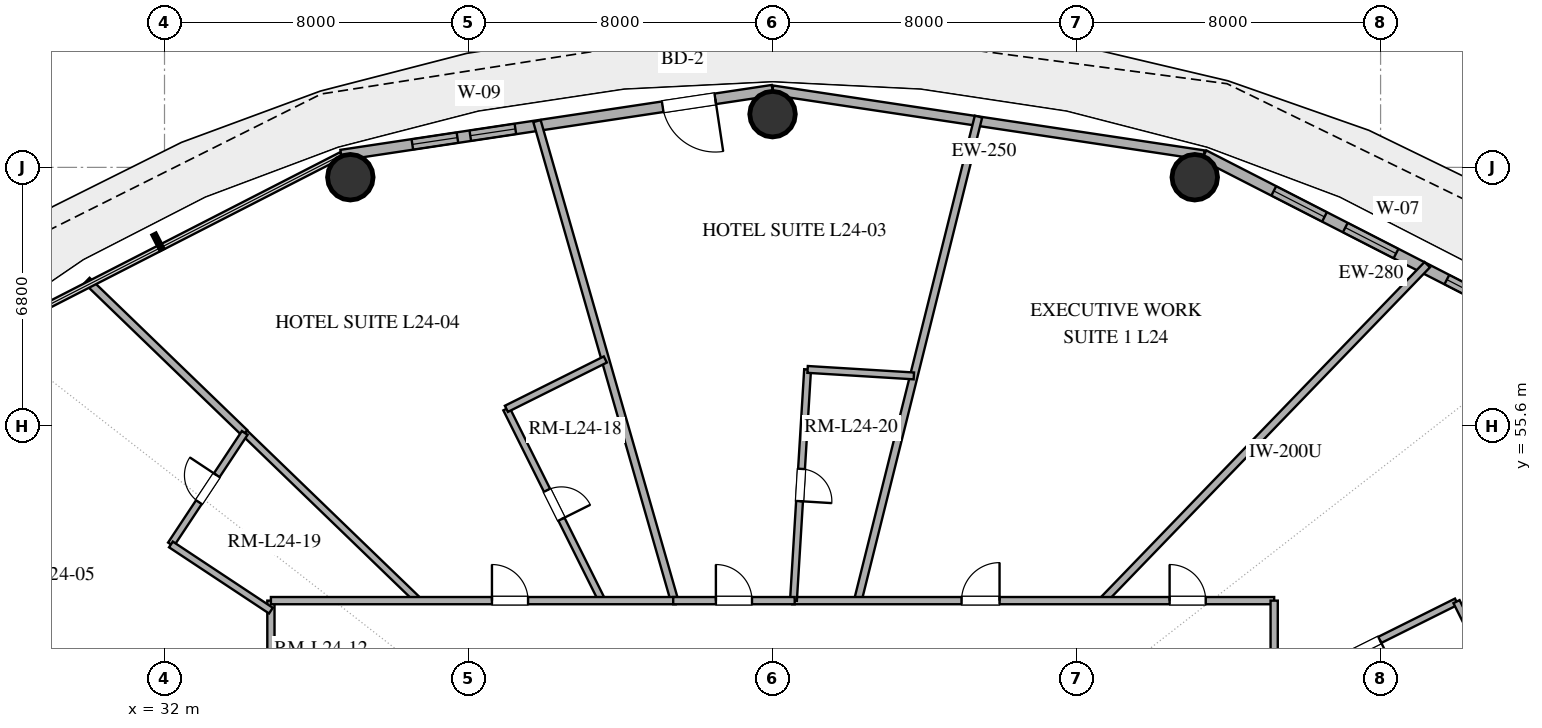
"""IFC4 building model, lengths in metres.
Left out: names, types, materials, properties, quantities, classifications, styles, units other than length and angle.
Written with IfcOpenShell. Run it as: python <this file> out.ifc"""

import sys

from ifc_helpers import new_model, si_unit, direction, frame, frame_2d, origin, origin_2d, place, context, subcontext, project, spatial, rectangle, hollow_circle, extrude, element, fill, save


model = new_model("IFC4")
c1 = context("Model", 3, precision=1e-05, world=origin(), true_north=direction((0.0, 1.0)))
c2 = subcontext(c1, "Body", "Model", "MODEL_VIEW")
j1 = project(units=[si_unit("LENGTHUNIT", "METRE"), si_unit("PLANEANGLEUNIT", "RADIAN")], contexts=[c1])
p1 = place(None, origin())
s1 = spatial("IfcSite", under=j1, at=p1, CompositionType="ELEMENT")
p2 = place(p1, origin())
s2 = spatial("IfcBuilding", under=s1, at=p2, CompositionType="ELEMENT")
p3 = place(p2, frame((0.0, 0.0, 98.4)))
s3 = spatial("IfcBuildingStorey", under=s2, at=p3, CompositionType="ELEMENT", Elevation=98.4)
for number, where, z_axis, x_axis in (
    (1, (59.11, 62.141, 0.0), (0.0, 0.0, 1.0), (1.0, 0.0, 0.0)),
    (2, (48.0, 63.8, 0.0), (0.0, 0.0, 1.0), (1.0, 0.0, 0.0)),
    (3, (36.89, 62.141, 0.0), (0.0, 0.0, 1.0), (1.0, 0.0, 0.0)),
):
    element("IfcColumn", number, at=place(p3, frame(where, z_axis=z_axis, x_axis=x_axis)), inside=s3, PredefinedType="COLUMN", context=c2, shape_type="SweptSolid", body=[
        extrude(hollow_circle(Radius=0.6, WallThickness=0.032, at=origin_2d()), origin(), (0.0, 0.0, 1.0), 3.38),
    ])
p4 = place(p3, frame((68.84, 57.86, 0.0), z_axis=(0.0, 0.0, 1.0), x_axis=(-0.889959505023, 0.45603955905, 0.0)))
e4 = element("IfcWall", 4, at=p4, inside=s3, PredefinedType="SOLIDWALL", context=c2, shape_type="SweptSolid", body=[
    extrude(rectangle(XDim=10.662, YDim=0.28, at=frame_2d((5.331, 0.0))), origin(), (0.0, 0.0, 1.0), 3.38),
])
p5 = place(p4, frame((1.979, 0.0, 0.85)))
e5 = element("IfcOpeningElement", 5, at=p5, cuts=e4, PredefinedType="OPENING", context=c2, shape_type="SweptSolid", body=[
    extrude(rectangle(XDim=1.5, YDim=2.0, at=frame_2d((0.75, 1.0))), frame((0.0, 0.15, 0.0), z_axis=(0.0, -1.0, 0.0), x_axis=(1.0, 0.0, 0.0)), (0.0, 0.0, 1.0), 0.3),
])
p6 = place(p4, frame((4.982, 0.0, 0.85)))
e6 = element("IfcOpeningElement", 6, at=p6, cuts=e4, PredefinedType="OPENING", context=c2, shape_type="SweptSolid", body=[
    extrude(rectangle(XDim=1.5, YDim=1.8, at=frame_2d((0.75, 0.9))), frame((0.0, 0.15, 0.0), z_axis=(0.0, -1.0, 0.0), x_axis=(1.0, 0.0, 0.0)), (0.0, 0.0, 1.0), 0.3),
])
p7 = place(p4, frame((7.096, 0.0, 0.85)))
e7 = element("IfcOpeningElement", 7, at=p7, cuts=e4, PredefinedType="OPENING", context=c2, shape_type="SweptSolid", body=[
    extrude(rectangle(XDim=1.5, YDim=1.8, at=frame_2d((0.75, 0.9))), frame((0.0, 0.15, 0.0), z_axis=(0.0, -1.0, 0.0), x_axis=(1.0, 0.0, 0.0)), (0.0, 0.0, 1.0), 0.3),
])
p8 = place(p3, frame((59.351, 62.723, 0.0), z_axis=(0.0, 0.0, 1.0), x_axis=(-0.988877774656, 0.148730450117, 0.0)))
e8 = element("IfcWall", 8, at=p8, inside=s3, PredefinedType="SOLIDWALL", context=c2, shape_type="SweptSolid", body=[
    extrude(rectangle(XDim=11.479, YDim=0.25, at=frame_2d((5.74, 0.0))), origin(), (0.0, 0.0, 1.0), 3.38),
])
p9 = place(p3, frame((48.0, 64.43, 0.0), z_axis=(0.0, 0.0, 1.0), x_axis=(-0.988877774656, -0.148730450117, 0.0)))
e9 = element("IfcWall", 9, at=p9, inside=s3, PredefinedType="SOLIDWALL", context=c2, shape_type="SweptSolid", body=[
    extrude(rectangle(XDim=11.479, YDim=0.28, at=frame_2d((5.74, 0.0))), origin(), (0.0, 0.0, 1.0), 3.38),
])
p10 = place(p9, frame((1.524, 0.0, 0.0)))
e10 = element("IfcOpeningElement", 10, at=p10, cuts=e9, PredefinedType="OPENING", context=c2, shape_type="SweptSolid", body=[
    extrude(rectangle(XDim=1.4, YDim=2.2, at=frame_2d((0.7, 1.1))), frame((0.0, 0.15, 0.0), z_axis=(0.0, -1.0, 0.0), x_axis=(1.0, 0.0, 0.0)), (0.0, 0.0, 1.0), 0.3),
])
p11 = place(p9, frame((6.843, 0.0, 0.85)))
e11 = element("IfcOpeningElement", 11, at=p11, cuts=e9, PredefinedType="OPENING", context=c2, shape_type="SweptSolid", body=[
    extrude(rectangle(XDim=1.2, YDim=1.8, at=frame_2d((0.6, 0.9))), frame((0.0, 0.15, 0.0), z_axis=(0.0, -1.0, 0.0), x_axis=(1.0, 0.0, 0.0)), (0.0, 0.0, 1.0), 0.3),
])
p12 = place(p9, frame((8.385, 0.0, 0.85)))
e12 = element("IfcOpeningElement", 12, at=p12, cuts=e9, PredefinedType="OPENING", context=c2, shape_type="SweptSolid", body=[
    extrude(rectangle(XDim=1.2, YDim=1.8, at=frame_2d((0.6, 0.9))), frame((0.0, 0.15, 0.0), z_axis=(0.0, -1.0, 0.0), x_axis=(1.0, 0.0, 0.0)), (0.0, 0.0, 1.0), 0.3),
])
p13 = place(p3, frame((65.228, 59.84, 0.0), z_axis=(0.0, 0.0, 1.0), x_axis=(-0.694672506389, -0.719326149161, 0.0)))
e13 = element("IfcWall", 13, at=p13, inside=s3, PredefinedType="PARTITIONING", context=c2, shape_type="SweptSolid", body=[
    extrude(rectangle(XDim=12.289, YDim=0.2, at=frame_2d((6.145, 0.0))), origin(), (0.0, 0.0, 1.0), 2.74),
])
p14 = place(p3, frame((61.2, 45.785, 0.0), z_axis=(0.0, 0.0, 1.0), x_axis=(0.961261030421, 0.275639676741, 0.0)))
e14 = element("IfcWall", 14, at=p14, inside=s3, PredefinedType="PARTITIONING", context=c2, shape_type="SweptSolid", body=[
    extrude(rectangle(XDim=14.531, YDim=0.2, at=frame_2d((7.266, 0.0))), origin(), (0.0, 0.0, 1.0), 2.74),
])
p15 = place(p3, frame((50.244, 51.0, 0.0), z_axis=(0.0, 0.0, 1.0), x_axis=(0.241918476077, 0.970296578852, 0.0)))
e15 = element("IfcWall", 15, at=p15, inside=s3, PredefinedType="PARTITIONING", context=c2, shape_type="SweptSolid", body=[
    extrude(rectangle(XDim=13.125, YDim=0.2, at=frame_2d((6.563, 0.0))), origin(), (0.0, 0.0, 1.0), 2.74),
])
p16 = place(p3, frame((45.419, 51.0, 0.0), z_axis=(0.0, 0.0, 1.0), x_axis=(-0.275639731411, 0.961261014745, 0.0)))
e16 = element("IfcWall", 16, at=p16, inside=s3, PredefinedType="PARTITIONING", context=c2, shape_type="SweptSolid", body=[
    extrude(rectangle(XDim=13.126, YDim=0.2, at=frame_2d((6.563, 0.0))), origin(), (0.0, 0.0, 1.0), 2.74),
])
p17 = place(p3, frame((48.518, 51.0, 0.0), z_axis=(0.0, 0.0, 1.0), x_axis=(1.0, 0.0, 0.0)))
e17 = element("IfcWall", 17, at=p17, inside=s3, PredefinedType="PARTITIONING", context=c2, shape_type="SweptSolid", body=[
    extrude(rectangle(XDim=12.682, YDim=0.19, at=frame_2d((6.341, 0.0))), origin(), (0.0, 0.0, 1.0), 2.74),
])
p18 = place(p17, frame((4.455, 0.0, 0.0)))
e18 = element("IfcOpeningElement", 18, at=p18, cuts=e17, PredefinedType="OPENING", context=c2, shape_type="SweptSolid", body=[
    extrude(rectangle(XDim=1.0, YDim=2.2, at=frame_2d((0.5, 1.1))), frame((0.0, 0.105, 0.0), z_axis=(0.0, -1.0, 0.0), x_axis=(1.0, 0.0, 0.0)), (0.0, 0.0, 1.0), 0.21),
])
p19 = place(p17, frame((9.93, 0.0, 0.0)))
e19 = element("IfcOpeningElement", 19, at=p19, cuts=e17, PredefinedType="OPENING", context=c2, shape_type="SweptSolid", body=[
    extrude(rectangle(XDim=0.95, YDim=2.15, at=frame_2d((0.475, 1.075))), frame((0.0, 0.105, 0.0), z_axis=(0.0, -1.0, 0.0), x_axis=(1.0, 0.0, 0.0)), (0.0, 0.0, 1.0), 0.21),
])
p20 = place(p3, frame((34.111, 55.413, 0.0), z_axis=(0.0, 0.0, 1.0), x_axis=(0.719318009274, -0.694680935059, 0.0)))
e20 = element("IfcWall", 20, at=p20, inside=s3, PredefinedType="PLUMBINGWALL", context=c2, shape_type="SweptSolid", body=[
    extrude(rectangle(XDim=6.352, YDim=0.18, at=frame_2d((3.176, 0.0))), origin(), (0.0, 0.0, 1.0), 2.74),
])
p21 = place(p3, frame((48.923, 57.084, 0.0), z_axis=(0.0, 0.0, 1.0), x_axis=(-0.061044096749, -0.998135070144, 0.0)))
e21 = element("IfcWall", 21, at=p21, inside=s3, PredefinedType="PLUMBINGWALL", context=c2, shape_type="SweptSolid", body=[
    extrude(rectangle(XDim=6.095, YDim=0.18, at=frame_2d((3.048, 0.0))), origin(), (0.0, 0.0, 1.0), 2.74),
])
p22 = place(p21, frame((2.623, 0.0, 0.0)))
e22 = element("IfcOpeningElement", 22, at=p22, cuts=e21, PredefinedType="OPENING", context=c2, shape_type="SweptSolid", body=[
    extrude(rectangle(XDim=0.85, YDim=2.1, at=frame_2d((0.425, 1.05))), frame((0.0, 0.1, 0.0), z_axis=(0.0, -1.0, 0.0), x_axis=(1.0, 0.0, 0.0)), (0.0, 0.0, 1.0), 0.2),
])
p23 = place(p3, frame((29.959, 59.422, 0.0), z_axis=(0.0, 0.0, 1.0), x_axis=(0.719370121813, -0.694626970281, 0.0)))
e23 = element("IfcWall", 23, at=p23, inside=s3, PredefinedType="PARTITIONING", context=c2, shape_type="SweptSolid", body=[
    extrude(rectangle(XDim=5.772, YDim=0.2, at=frame_2d((2.886, 0.0))), origin(), (0.0, 0.0, 1.0), 2.74),
])
p24 = place(p3, frame((40.997, 56.047, 0.0), z_axis=(0.0, 0.0, 1.0), x_axis=(0.446174269641, -0.894946099556, 0.0)))
e24 = element("IfcWall", 24, at=p24, inside=s3, PredefinedType="PLUMBINGWALL", context=c2, shape_type="SweptSolid", body=[
    extrude(rectangle(XDim=5.639, YDim=0.18, at=frame_2d((2.82, 0.0))), origin(), (0.0, 0.0, 1.0), 2.74),
])
p25 = place(p24, frame((2.395, 0.0, 0.0)))
e25 = element("IfcOpeningElement", 25, at=p25, cuts=e24, PredefinedType="OPENING", context=c2, shape_type="SweptSolid", body=[
    extrude(rectangle(XDim=0.85, YDim=2.1, at=frame_2d((0.425, 1.05))), frame((0.0, 0.1, 0.0), z_axis=(0.0, -1.0, 0.0), x_axis=(1.0, 0.0, 0.0)), (0.0, 0.0, 1.0), 0.2),
])
p26 = place(p3, frame((34.8, 42.775, 0.0), z_axis=(0.0, 0.0, 1.0), x_axis=(0.0, 1.0, 0.0)))
e26 = element("IfcWall", 26, at=p26, inside=s3, PredefinedType="PARTITIONING", context=c2, shape_type="SweptSolid", body=[
    extrude(rectangle(XDim=8.225, YDim=0.19, at=frame_2d((4.112, 0.0))), origin(), (0.0, 0.0, 1.0), 2.74),
])
p27 = place(p26, frame((4.767, 0.0, 0.0)))
e27 = element("IfcOpeningElement", 27, at=p27, cuts=e26, PredefinedType="OPENING", context=c2, shape_type="SweptSolid", body=[
    extrude(rectangle(XDim=0.95, YDim=2.15, at=frame_2d((0.475, 1.075))), frame((0.0, 0.105, 0.0), z_axis=(0.0, -1.0, 0.0), x_axis=(1.0, 0.0, 0.0)), (0.0, 0.0, 1.0), 0.21),
])
p28 = place(p3, frame((65.998, 50.973, 0.0), z_axis=(0.0, 0.0, 1.0), x_axis=(-0.894936648514, -0.446193226244, 0.0)))
e28 = element("IfcWall", 28, at=p28, inside=s3, PredefinedType="PLUMBINGWALL", context=c2, shape_type="SweptSolid", body=[
    extrude(rectangle(XDim=5.361, YDim=0.18, at=frame_2d((2.681, 0.0))), origin(), (0.0, 0.0, 1.0), 2.74),
])
p29 = place(p28, frame((2.256, 0.0, 0.0)))
e29 = element("IfcOpeningElement", 29, at=p29, cuts=e28, PredefinedType="OPENING", context=c2, shape_type="SweptSolid", body=[
    extrude(rectangle(XDim=0.85, YDim=2.1, at=frame_2d((0.425, 1.05))), frame((0.0, 0.1, 0.0), z_axis=(0.0, -1.0, 0.0), x_axis=(1.0, 0.0, 0.0)), (0.0, 0.0, 1.0), 0.2),
])
p30 = place(p3, frame((34.8, 51.0, 0.0), z_axis=(0.0, 0.0, 1.0), x_axis=(1.0, 0.0, 0.0)))
e30 = element("IfcWall", 30, at=p30, inside=s3, PredefinedType="PARTITIONING", context=c2, shape_type="SweptSolid", body=[
    extrude(rectangle(XDim=10.653, YDim=0.19, at=frame_2d((5.326, 0.0))), origin(), (0.0, 0.0, 1.0), 2.74),
])
p31 = place(p30, frame((5.816, 0.0, 0.0)))
e31 = element("IfcOpeningElement", 31, at=p31, cuts=e30, PredefinedType="OPENING", context=c2, shape_type="SweptSolid", body=[
    extrude(rectangle(XDim=0.95, YDim=2.15, at=frame_2d((0.475, 1.075))), frame((0.0, 0.105, 0.0), z_axis=(0.0, -1.0, 0.0), x_axis=(1.0, 0.0, 0.0)), (0.0, 0.0, 1.0), 0.21),
])
p32 = place(p3, frame((61.2, 51.0, 0.0), z_axis=(0.0, 0.0, 1.0), x_axis=(0.0, -1.0, 0.0)))
e32 = element("IfcWall", 32, at=p32, inside=s3, PredefinedType="PARTITIONING", context=c2, shape_type="SweptSolid", body=[
    extrude(rectangle(XDim=9.839, YDim=0.19, at=frame_2d((4.92, 0.0))), origin(), (0.0, 0.0, 1.0), 2.74),
])
p33 = place(p32, frame((7.035, 0.0, 0.0)))
e33 = element("IfcOpeningElement", 33, at=p33, cuts=e32, PredefinedType="OPENING", context=c2, shape_type="SweptSolid", body=[
    extrude(rectangle(XDim=0.95, YDim=2.15, at=frame_2d((0.475, 1.075))), frame((0.0, 0.105, 0.0), z_axis=(0.0, -1.0, 0.0), x_axis=(1.0, 0.0, 0.0)), (0.0, 0.0, 1.0), 0.21),
])
p34 = place(p3, frame((67.661, 47.638, 0.0), z_axis=(0.0, 0.0, 1.0), x_axis=(-0.446243949247, 0.894911357488, 0.0)))
e34 = element("IfcWall", 34, at=p34, inside=s3, PredefinedType="PLUMBINGWALL", context=c2, shape_type="SweptSolid", body=[
    extrude(rectangle(XDim=3.727, YDim=0.18, at=frame_2d((1.864, 0.0))), origin(), (0.0, 0.0, 1.0), 2.74),
])
p35 = place(p3, frame((32.169, 52.479, 0.0), z_axis=(0.0, 0.0, 1.0), x_axis=(0.551959146688, 0.833871153349, 0.0)))
e35 = element("IfcWall", 35, at=p35, inside=s3, PredefinedType="PLUMBINGWALL", context=c2, shape_type="SweptSolid", body=[
    extrude(rectangle(XDim=3.519, YDim=0.18, at=frame_2d((1.759, 0.0))), origin(), (0.0, 0.0, 1.0), 2.74),
])
p36 = place(p35, frame((1.334, 0.0, 0.0)))
e36 = element("IfcOpeningElement", 36, at=p36, cuts=e35, PredefinedType="OPENING", context=c2, shape_type="SweptSolid", body=[
    extrude(rectangle(XDim=0.85, YDim=2.1, at=frame_2d((0.425, 1.05))), frame((0.0, 0.1, 0.0), z_axis=(0.0, -1.0, 0.0), x_axis=(1.0, 0.0, 0.0)), (0.0, 0.0, 1.0), 0.2),
])
p37 = place(p3, frame((45.386, 51.0, 0.0), z_axis=(0.0, 0.0, 1.0), x_axis=(1.0, 0.0, 0.0)))
e37 = element("IfcWall", 37, at=p37, inside=s3, PredefinedType="PARTITIONING", context=c2, shape_type="SweptSolid", body=[
    extrude(rectangle(XDim=3.197, YDim=0.19, at=frame_2d((1.598, 0.0))), origin(), (0.0, 0.0, 1.0), 2.74),
])
p38 = place(p37, frame((1.123, 0.0, 0.0)))
e38 = element("IfcOpeningElement", 38, at=p38, cuts=e37, PredefinedType="OPENING", context=c2, shape_type="SweptSolid", body=[
    extrude(rectangle(XDim=0.95, YDim=2.15, at=frame_2d((0.475, 1.075))), frame((0.0, 0.105, 0.0), z_axis=(0.0, -1.0, 0.0), x_axis=(1.0, 0.0, 0.0)), (0.0, 0.0, 1.0), 0.21),
])
p39 = place(p3, frame((34.8, 50.737, 0.0), z_axis=(0.0, 0.0, 1.0), x_axis=(-0.833855219674, 0.5519832177, 0.0)))
e39 = element("IfcWall", 39, at=p39, inside=s3, PredefinedType="PLUMBINGWALL", context=c2, shape_type="SweptSolid", body=[
    extrude(rectangle(XDim=3.155, YDim=0.18, at=frame_2d((1.578, 0.0))), origin(), (0.0, 0.0, 1.0), 2.74),
])
p40 = place(p3, frame((43.6, 57.345, 0.0), z_axis=(0.0, 0.0, 1.0), x_axis=(-0.894913437672, -0.446239777558, 0.0)))
e40 = element("IfcWall", 40, at=p40, inside=s3, PredefinedType="PLUMBINGWALL", context=c2, shape_type="SweptSolid", body=[
    extrude(rectangle(XDim=2.909, YDim=0.18, at=frame_2d((1.455, 0.0))), origin(), (0.0, 0.0, 1.0), 2.74),
])
p41 = place(p3, frame((51.718, 56.913, 0.0), z_axis=(0.0, 0.0, 1.0), x_axis=(-0.998136779925, 0.061016133608, 0.0)))
e41 = element("IfcWall", 41, at=p41, inside=s3, PredefinedType="PLUMBINGWALL", context=c2, shape_type="SweptSolid", body=[
    extrude(rectangle(XDim=2.801, YDim=0.18, at=frame_2d((1.4, 0.0))), origin(), (0.0, 0.0, 1.0), 2.74),
])
p42 = place(p5, origin())
e42 = element("IfcWindow", 42, at=p42, inside=s3, PartitioningType="SINGLE_PANEL", PredefinedType="WINDOW", context=c2, shape_type="SweptSolid", body=[
    extrude(rectangle(XDim=1.5, YDim=2.0, at=frame_2d((0.75, 1.0))), frame((0.0, 0.03, 0.0), z_axis=(0.0, -1.0, 0.0), x_axis=(1.0, 0.0, 0.0)), (0.0, 0.0, 1.0), 0.06),
])
fill(e5, e42)
p43 = place(p6, origin())
e43 = element("IfcWindow", 43, at=p43, inside=s3, PartitioningType="SINGLE_PANEL", PredefinedType="WINDOW", context=c2, shape_type="SweptSolid", body=[
    extrude(rectangle(XDim=1.5, YDim=1.8, at=frame_2d((0.75, 0.9))), frame((0.0, 0.03, 0.0), z_axis=(0.0, -1.0, 0.0), x_axis=(1.0, 0.0, 0.0)), (0.0, 0.0, 1.0), 0.06),
])
fill(e6, e43)
p44 = place(p7, origin())
e44 = element("IfcWindow", 44, at=p44, inside=s3, PartitioningType="SINGLE_PANEL", PredefinedType="WINDOW", context=c2, shape_type="SweptSolid", body=[
    extrude(rectangle(XDim=1.5, YDim=1.8, at=frame_2d((0.75, 0.9))), frame((0.0, 0.03, 0.0), z_axis=(0.0, -1.0, 0.0), x_axis=(1.0, 0.0, 0.0)), (0.0, 0.0, 1.0), 0.06),
])
fill(e7, e44)
p45 = place(p10, origin())
e45 = element("IfcDoor", 45, at=p45, inside=s3, OperationType="SINGLE_SWING_LEFT", PredefinedType="DOOR", context=c2, shape_type="SweptSolid", body=[
    extrude(rectangle(XDim=1.4, YDim=2.2, at=frame_2d((0.7, 1.1))), frame((0.0, 0.025, 0.0), z_axis=(0.0, -1.0, 0.0), x_axis=(1.0, 0.0, 0.0)), (0.0, 0.0, 1.0), 0.05),
])
fill(e10, e45)
p46 = place(p11, origin())
e46 = element("IfcWindow", 46, at=p46, inside=s3, PartitioningType="SINGLE_PANEL", PredefinedType="WINDOW", context=c2, shape_type="SweptSolid", body=[
    extrude(rectangle(XDim=1.2, YDim=1.8, at=frame_2d((0.6, 0.9))), frame((0.0, 0.03, 0.0), z_axis=(0.0, -1.0, 0.0), x_axis=(1.0, 0.0, 0.0)), (0.0, 0.0, 1.0), 0.06),
])
fill(e11, e46)
p47 = place(p12, origin())
e47 = element("IfcWindow", 47, at=p47, inside=s3, PartitioningType="SINGLE_PANEL", PredefinedType="WINDOW", context=c2, shape_type="SweptSolid", body=[
    extrude(rectangle(XDim=1.2, YDim=1.8, at=frame_2d((0.6, 0.9))), frame((0.0, 0.03, 0.0), z_axis=(0.0, -1.0, 0.0), x_axis=(1.0, 0.0, 0.0)), (0.0, 0.0, 1.0), 0.06),
])
fill(e12, e47)
p48 = place(p18, origin())
e48 = element("IfcDoor", 48, at=p48, inside=s3, OperationType="SINGLE_SWING_RIGHT", PredefinedType="DOOR", context=c2, shape_type="SweptSolid", body=[
    extrude(rectangle(XDim=1.0, YDim=2.2, at=frame_2d((0.5, 1.1))), frame((0.0, 0.025, 0.0), z_axis=(0.0, -1.0, 0.0), x_axis=(1.0, 0.0, 0.0)), (0.0, 0.0, 1.0), 0.05),
])
fill(e18, e48)
p49 = place(p19, origin())
e49 = element("IfcDoor", 49, at=p49, inside=s3, OperationType="SINGLE_SWING_LEFT", PredefinedType="DOOR", context=c2, shape_type="SweptSolid", body=[
    extrude(rectangle(XDim=0.95, YDim=2.15, at=frame_2d((0.475, 1.075))), frame((0.0, 0.025, 0.0), z_axis=(0.0, -1.0, 0.0), x_axis=(1.0, 0.0, 0.0)), (0.0, 0.0, 1.0), 0.05),
])
fill(e19, e49)
p50 = place(p22, origin())
e50 = element("IfcDoor", 50, at=p50, inside=s3, OperationType="SINGLE_SWING_RIGHT", PredefinedType="DOOR", context=c2, shape_type="SweptSolid", body=[
    extrude(rectangle(XDim=0.85, YDim=2.1, at=frame_2d((0.425, 1.05))), frame((0.0, 0.025, 0.0), z_axis=(0.0, -1.0, 0.0), x_axis=(1.0, 0.0, 0.0)), (0.0, 0.0, 1.0), 0.05),
])
fill(e22, e50)
p51 = place(p25, origin())
e51 = element("IfcDoor", 51, at=p51, inside=s3, OperationType="SINGLE_SWING_RIGHT", PredefinedType="DOOR", context=c2, shape_type="SweptSolid", body=[
    extrude(rectangle(XDim=0.85, YDim=2.1, at=frame_2d((0.425, 1.05))), frame((0.0, 0.025, 0.0), z_axis=(0.0, -1.0, 0.0), x_axis=(1.0, 0.0, 0.0)), (0.0, 0.0, 1.0), 0.05),
])
fill(e25, e51)
p52 = place(p29, origin())
e52 = element("IfcDoor", 52, at=p52, inside=s3, OperationType="SINGLE_SWING_LEFT", PredefinedType="DOOR", context=c2, shape_type="SweptSolid", body=[
    extrude(rectangle(XDim=0.85, YDim=2.1, at=frame_2d((0.425, 1.05))), frame((0.0, 0.025, 0.0), z_axis=(0.0, -1.0, 0.0), x_axis=(1.0, 0.0, 0.0)), (0.0, 0.0, 1.0), 0.05),
])
fill(e29, e52)
p53 = place(p31, origin())
e53 = element("IfcDoor", 53, at=p53, inside=s3, OperationType="SINGLE_SWING_LEFT", PredefinedType="DOOR", context=c2, shape_type="SweptSolid", body=[
    extrude(rectangle(XDim=0.95, YDim=2.15, at=frame_2d((0.475, 1.075))), frame((0.0, 0.025, 0.0), z_axis=(0.0, -1.0, 0.0), x_axis=(1.0, 0.0, 0.0)), (0.0, 0.0, 1.0), 0.05),
])
fill(e31, e53)
p54 = place(p36, origin())
e54 = element("IfcDoor", 54, at=p54, inside=s3, OperationType="SINGLE_SWING_RIGHT", PredefinedType="DOOR", context=c2, shape_type="SweptSolid", body=[
    extrude(rectangle(XDim=0.85, YDim=2.1, at=frame_2d((0.425, 1.05))), frame((0.0, 0.025, 0.0), z_axis=(0.0, -1.0, 0.0), x_axis=(1.0, 0.0, 0.0)), (0.0, 0.0, 1.0), 0.05),
])
fill(e36, e54)
p55 = place(p38, origin())
e55 = element("IfcDoor", 55, at=p55, inside=s3, OperationType="SINGLE_SWING_LEFT", PredefinedType="DOOR", context=c2, shape_type="SweptSolid", body=[
    extrude(rectangle(XDim=0.95, YDim=2.15, at=frame_2d((0.475, 1.075))), frame((0.0, 0.025, 0.0), z_axis=(0.0, -1.0, 0.0), x_axis=(1.0, 0.0, 0.0)), (0.0, 0.0, 1.0), 0.05),
])
fill(e38, e55)
save(model, sys.argv[1])
